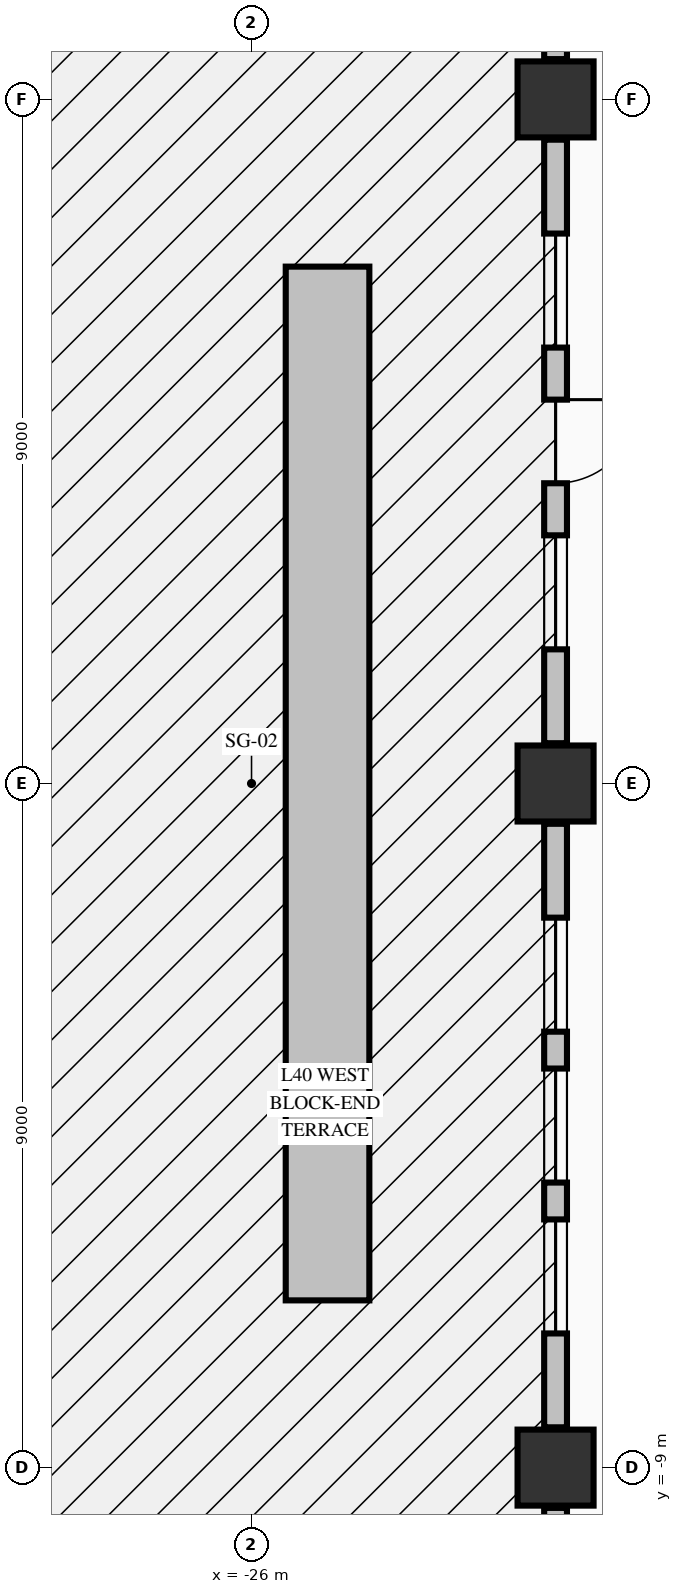
"""IFC4 building model, lengths in metres.
Left out: names, types, materials, properties, quantities, classifications, styles, units other than length and angle.
Written with IfcOpenShell. Run it as: python <this file> out.ifc"""

import sys

from ifc_helpers import new_model, si_unit, direction, frame, frame_2d, origin, origin_2d, place, context, subcontext, project, spatial, rectangle, extrude, element, fill, save


model = new_model("IFC4")
c1 = context("Model", 3, precision=1e-05, world=origin(), true_north=direction((0.0, 1.0)))
c2 = subcontext(c1, "Body", "Model", "MODEL_VIEW")
j1 = project(units=[si_unit("LENGTHUNIT", "METRE"), si_unit("PLANEANGLEUNIT", "RADIAN")], contexts=[c1])
p1 = place(None, origin())
s1 = spatial("IfcSite", under=j1, at=p1, CompositionType="ELEMENT")
p2 = place(p1, origin())
s2 = spatial("IfcBuilding", under=s1, at=p2, CompositionType="ELEMENT")
p3 = place(p2, frame((0.0, 0.0, 158.24)))
s3 = spatial("IfcBuildingStorey", under=s2, at=p3, CompositionType="ELEMENT", Elevation=158.24)
for number, where, z_axis, x_axis in (
    (1, (-22.0, -9.0, -0.425), (0.0, 0.0, 1.0), (1.0, 0.0, 0.0)),
    (2, (-22.0, 0.0, -0.425), (0.0, 0.0, 1.0), (1.0, 0.0, 0.0)),
    (3, (-22.0, 9.0, -0.425), (0.0, 0.0, 1.0), (1.0, 0.0, 0.0)),
):
    element("IfcColumn", number, at=place(p3, frame(where, z_axis=z_axis, x_axis=x_axis)), inside=s3, PredefinedType="COLUMN", context=c2, shape_type="SweptSolid", body=[
        extrude(rectangle(XDim=1.0, YDim=1.0, at=origin_2d()), origin(), (0.0, 0.0, 1.0), 4.595),
    ])
p4 = place(p3, frame((-22.0, -9.53, 0.0), z_axis=(0.0, 0.0, 1.0), x_axis=(0.0, -1.0, 0.0)))
e4 = element("IfcWall", 4, at=p4, inside=s3, PredefinedType="STANDARD", context=c2, shape_type="SweptSolid", body=[
    extrude(rectangle(XDim=9.44, YDim=0.3, at=frame_2d((4.72, 0.0))), origin(), (0.0, 0.0, 1.0), 3.562),
])
p5 = place(p3, frame((-22.0, -0.53, 0.0), z_axis=(0.0, 0.0, 1.0), x_axis=(0.0, -1.0, 0.0)))
e5 = element("IfcWall", 5, at=p5, inside=s3, PredefinedType="STANDARD", context=c2, shape_type="SweptSolid", body=[
    extrude(rectangle(XDim=7.94, YDim=0.3, at=frame_2d((3.97, 0.0))), origin(), (0.0, 0.0, 1.0), 3.562),
])
p6 = place(p5, frame((1.235, 0.0, 0.72)))
e6 = element("IfcOpeningElement", 6, at=p6, cuts=e5, PredefinedType="OPENING", context=c2, shape_type="SweptSolid", body=[
    extrude(rectangle(XDim=1.5, YDim=1.6, at=frame_2d((0.75, 0.8))), frame((0.0, 0.16, 0.0), z_axis=(0.0, -1.0, 0.0), x_axis=(1.0, 0.0, 0.0)), (0.0, 0.0, 1.0), 0.32),
])
p7 = place(p5, frame((3.22, 0.0, 0.72)))
e7 = element("IfcOpeningElement", 7, at=p7, cuts=e5, PredefinedType="OPENING", context=c2, shape_type="SweptSolid", body=[
    extrude(rectangle(XDim=1.5, YDim=1.6, at=frame_2d((0.75, 0.8))), frame((0.0, 0.16, 0.0), z_axis=(0.0, -1.0, 0.0), x_axis=(1.0, 0.0, 0.0)), (0.0, 0.0, 1.0), 0.32),
])
p8 = place(p5, frame((5.205, 0.0, 0.72)))
e8 = element("IfcOpeningElement", 8, at=p8, cuts=e5, PredefinedType="OPENING", context=c2, shape_type="SweptSolid", body=[
    extrude(rectangle(XDim=1.5, YDim=1.6, at=frame_2d((0.75, 0.8))), frame((0.0, 0.16, 0.0), z_axis=(0.0, -1.0, 0.0), x_axis=(1.0, 0.0, 0.0)), (0.0, 0.0, 1.0), 0.32),
])
p9 = place(p3, frame((-22.0, 8.47, 0.0), z_axis=(0.0, 0.0, 1.0), x_axis=(0.0, -1.0, 0.0)))
e9 = element("IfcWall", 9, at=p9, inside=s3, PredefinedType="STANDARD", context=c2, shape_type="SweptSolid", body=[
    extrude(rectangle(XDim=7.94, YDim=0.3, at=frame_2d((3.97, 0.0))), origin(), (0.0, 0.0, 1.0), 3.562),
])
p10 = place(p9, frame((3.42, 0.0, 0.0)))
e10 = element("IfcOpeningElement", 10, at=p10, cuts=e9, PredefinedType="OPENING", context=c2, shape_type="SweptSolid", body=[
    extrude(rectangle(XDim=1.1, YDim=2.15, at=frame_2d((0.55, 1.075))), frame((0.0, 0.16, 0.0), z_axis=(0.0, -1.0, 0.0), x_axis=(1.0, 0.0, 0.0)), (0.0, 0.0, 1.0), 0.32),
])
p11 = place(p9, frame((1.235, 0.0, 0.72)))
e11 = element("IfcOpeningElement", 11, at=p11, cuts=e9, PredefinedType="OPENING", context=c2, shape_type="SweptSolid", body=[
    extrude(rectangle(XDim=1.5, YDim=1.6, at=frame_2d((0.75, 0.8))), frame((0.0, 0.16, 0.0), z_axis=(0.0, -1.0, 0.0), x_axis=(1.0, 0.0, 0.0)), (0.0, 0.0, 1.0), 0.32),
])
p12 = place(p9, frame((5.205, 0.0, 0.72)))
e12 = element("IfcOpeningElement", 12, at=p12, cuts=e9, PredefinedType="OPENING", context=c2, shape_type="SweptSolid", body=[
    extrude(rectangle(XDim=1.5, YDim=1.6, at=frame_2d((0.75, 0.8))), frame((0.0, 0.16, 0.0), z_axis=(0.0, -1.0, 0.0), x_axis=(1.0, 0.0, 0.0)), (0.0, 0.0, 1.0), 0.32),
])
p13 = place(p3, frame((-22.0, 18.97, 0.0), z_axis=(0.0, 0.0, 1.0), x_axis=(0.0, -1.0, 0.0)))
e13 = element("IfcWall", 13, at=p13, inside=s3, PredefinedType="STANDARD", context=c2, shape_type="SweptSolid", body=[
    extrude(rectangle(XDim=9.44, YDim=0.3, at=frame_2d((4.72, 0.0))), origin(), (0.0, 0.0, 1.0), 3.562),
])
p14 = place(p3, frame((-25.0, -6.8, -0.04), z_axis=(0.0, 0.0, 1.0), x_axis=(0.0, 1.0, 0.0)))
e14 = element("IfcWall", 14, at=p14, inside=s3, PredefinedType="PARAPET", context=c2, shape_type="SweptSolid", body=[
    extrude(rectangle(XDim=13.6, YDim=1.1, at=frame_2d((6.8, 0.0))), origin(), (0.0, 0.0, 1.0), 0.6),
])
p15 = place(p6, origin())
e15 = element("IfcWindow", 15, at=p15, inside=s3, PartitioningType="SINGLE_PANEL", PredefinedType="WINDOW", context=c2, shape_type="SweptSolid", body=[
    extrude(rectangle(XDim=1.5, YDim=1.6, at=frame_2d((0.75, 0.8))), frame((0.0, 0.03, 0.0), z_axis=(0.0, -1.0, 0.0), x_axis=(1.0, 0.0, 0.0)), (0.0, 0.0, 1.0), 0.06),
])
fill(e6, e15)
p16 = place(p7, origin())
e16 = element("IfcWindow", 16, at=p16, inside=s3, PartitioningType="SINGLE_PANEL", PredefinedType="WINDOW", context=c2, shape_type="SweptSolid", body=[
    extrude(rectangle(XDim=1.5, YDim=1.6, at=frame_2d((0.75, 0.8))), frame((0.0, 0.03, 0.0), z_axis=(0.0, -1.0, 0.0), x_axis=(1.0, 0.0, 0.0)), (0.0, 0.0, 1.0), 0.06),
])
fill(e7, e16)
p17 = place(p8, origin())
e17 = element("IfcWindow", 17, at=p17, inside=s3, PartitioningType="SINGLE_PANEL", PredefinedType="WINDOW", context=c2, shape_type="SweptSolid", body=[
    extrude(rectangle(XDim=1.5, YDim=1.6, at=frame_2d((0.75, 0.8))), frame((0.0, 0.03, 0.0), z_axis=(0.0, -1.0, 0.0), x_axis=(1.0, 0.0, 0.0)), (0.0, 0.0, 1.0), 0.06),
])
fill(e8, e17)
p18 = place(p10, origin())
e18 = element("IfcDoor", 18, at=p18, inside=s3, OperationType="SINGLE_SWING_LEFT", PredefinedType="DOOR", context=c2, shape_type="SweptSolid", body=[
    extrude(rectangle(XDim=1.1, YDim=2.15, at=frame_2d((0.55, 1.075))), frame((0.0, 0.025, 0.0), z_axis=(0.0, -1.0, 0.0), x_axis=(1.0, 0.0, 0.0)), (0.0, 0.0, 1.0), 0.05),
])
fill(e10, e18)
p19 = place(p11, origin())
e19 = element("IfcWindow", 19, at=p19, inside=s3, PartitioningType="SINGLE_PANEL", PredefinedType="WINDOW", context=c2, shape_type="SweptSolid", body=[
    extrude(rectangle(XDim=1.5, YDim=1.6, at=frame_2d((0.75, 0.8))), frame((0.0, 0.03, 0.0), z_axis=(0.0, -1.0, 0.0), x_axis=(1.0, 0.0, 0.0)), (0.0, 0.0, 1.0), 0.06),
])
fill(e11, e19)
p20 = place(p12, origin())
e20 = element("IfcWindow", 20, at=p20, inside=s3, PartitioningType="SINGLE_PANEL", PredefinedType="WINDOW", context=c2, shape_type="SweptSolid", body=[
    extrude(rectangle(XDim=1.5, YDim=1.6, at=frame_2d((0.75, 0.8))), frame((0.0, 0.03, 0.0), z_axis=(0.0, -1.0, 0.0), x_axis=(1.0, 0.0, 0.0)), (0.0, 0.0, 1.0), 0.06),
])
fill(e12, e20)
save(model, sys.argv[1])
